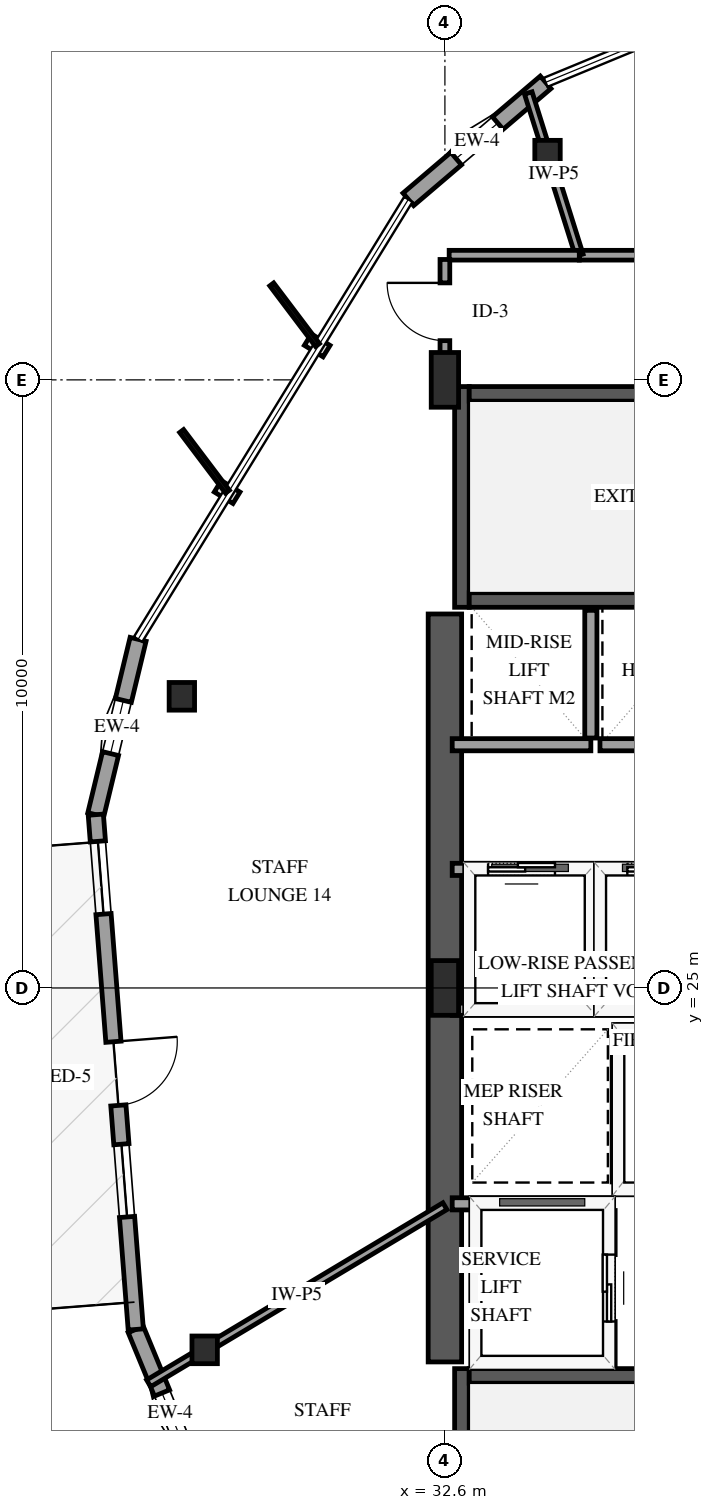
"""IFC4 building model, lengths in metres.
Left out: names, types, materials, properties, quantities, classifications, styles, units other than length and angle.
Written with IfcOpenShell. Run it as: python <this file> out.ifc"""

import sys

from ifc_helpers import new_model, si_unit, direction, frame, frame_2d, origin, origin_2d, place, context, subcontext, project, spatial, rectangle, i_section, extrude, element, fill, save


model = new_model("IFC4")
c1 = context("Model", 3, precision=1e-05, world=origin(), true_north=direction((0.0, 1.0)))
c2 = subcontext(c1, "Body", "Model", "MODEL_VIEW")
j1 = project(units=[si_unit("LENGTHUNIT", "METRE"), si_unit("PLANEANGLEUNIT", "RADIAN")], contexts=[c1])
p1 = place(None, origin())
s1 = spatial("IfcSite", under=j1, at=p1, CompositionType="ELEMENT")
p2 = place(p1, origin())
s2 = spatial("IfcBuilding", under=s1, at=p2, CompositionType="ELEMENT")
p3 = place(p2, frame((0.0, 0.0, 114.7)))
s3 = spatial("IfcBuildingStorey", under=s2, at=p3, CompositionType="ELEMENT", Elevation=114.7)
p4 = place(p3, frame((32.88, 15.11, 0.0), z_axis=(0.0, 0.0, 1.0), x_axis=(0.0, 1.0, 0.0)))
e1 = element("IfcWall", 1, at=p4, inside=s3, PredefinedType="SHEAR", context=c2, shape_type="SweptSolid", body=[
    extrude(rectangle(XDim=3.63, YDim=0.24, at=frame_2d((1.815, 0.0))), origin(), (0.0, 0.0, 1.0), 3.9),
])
p5 = place(p3, frame((33.0, 18.62, 0.0), z_axis=(0.0, 0.0, 1.0), x_axis=(1.0, 0.0, 0.0)))
e2 = element("IfcWall", 2, at=p5, inside=s3, PredefinedType="SHEAR", context=c2, shape_type="SweptSolid", body=[
    extrude(rectangle(XDim=8.0, YDim=0.24, at=frame_2d((4.0, 0.0))), origin(), (0.0, 0.0, 1.0), 3.9),
])
p6 = place(p3, frame((32.88, 31.26, 0.0), z_axis=(0.0, 0.0, 1.0), x_axis=(0.0, 1.0, 0.0)))
e3 = element("IfcWall", 3, at=p6, inside=s3, PredefinedType="SHEAR", context=c2, shape_type="SweptSolid", body=[
    extrude(rectangle(XDim=3.63, YDim=0.24, at=frame_2d((1.815, 0.0))), origin(), (0.0, 0.0, 1.0), 3.9),
])
for number, where, z_axis, x_axis in (
    (4, (33.0, 31.38, 0.0), (0.0, 0.0, 1.0), (1.0, 0.0, 0.0)),
    (5, (33.0, 34.77, 0.0), (0.0, 0.0, 1.0), (1.0, 0.0, 0.0)),
):
    element("IfcWall", number, at=place(p3, frame(where, z_axis=z_axis, x_axis=x_axis)), inside=s3, PredefinedType="SHEAR", context=c2, shape_type="SweptSolid", body=[
        extrude(rectangle(XDim=8.0, YDim=0.24, at=frame_2d((4.0, 0.0))), origin(), (0.0, 0.0, 1.0), 3.9),
    ])
p7 = place(p3, frame((32.6, 18.85, 0.0), z_axis=(0.0, 0.0, 1.0), x_axis=(0.0, 1.0, 0.0)))
e6 = element("IfcWall", 6, at=p7, inside=s3, PredefinedType="SHEAR", context=c2, shape_type="SweptSolid", body=[
    extrude(rectangle(XDim=12.3, YDim=0.55, at=frame_2d((6.15, 0.0))), origin(), (0.0, 0.0, 1.0), 3.9),
])
for number, where, z_axis, x_axis in (
    (7, (32.6, 25.0, 0.0), (0.0, 0.0, 1.0), (1.0, 0.0, 0.0)),
    (8, (32.6, 35.0, 0.0), (0.0, 0.0, 1.0), (1.0, 0.0, 0.0)),
):
    element("IfcColumn", number, at=place(p3, frame(where, z_axis=z_axis, x_axis=x_axis)), inside=s3, PredefinedType="PILASTER", context=c2, shape_type="SweptSolid", body=[
        extrude(rectangle(XDim=0.45, YDim=0.9, at=origin_2d()), origin(), (0.0, 0.0, 1.0), 3.9),
    ])
for number, where, z_axis, x_axis in (
    (9, (34.288, 38.711, 0.0), (0.0, 0.0, 1.0), (1.0, 0.0, 0.0)),
    (10, (28.274, 29.796, 0.0), (0.0, 0.0, 1.0), (1.0, 0.0, 0.0)),
    (11, (28.649, 19.049, 0.0), (0.0, 0.0, 1.0), (1.0, 0.0, 0.0)),
):
    element("IfcColumn", number, at=place(p3, frame(where, z_axis=z_axis, x_axis=x_axis)), inside=s3, PredefinedType="COLUMN", context=c2, shape_type="SweptSolid", body=[
        extrude(i_section(OverallWidth=0.418, OverallDepth=0.455, WebThickness=0.042, FlangeThickness=0.068, FilletRadius=0.038, at=origin_2d()), origin(), (0.0, 0.0, 1.0), 3.9),
    ])
p8 = place(p3, frame((34.256, 39.893, 0.0), z_axis=(0.0, 0.0, 1.0), x_axis=(-0.761118325799, -0.648613054241, 0.0)))
e12 = element("IfcWall", 12, at=p8, inside=s3, PredefinedType="SOLIDWALL", context=c2, shape_type="SweptSolid", body=[
    extrude(rectangle(XDim=2.967, YDim=0.27, at=frame_2d((1.483, 0.0))), origin(), (0.0, 0.0, 1.0), 2.979),
])
p9 = place(p8, frame((1.033, 0.0, 0.75)))
e13 = element("IfcOpeningElement", 13, at=p9, cuts=e12, PredefinedType="OPENING", context=c2, shape_type="SweptSolid", body=[
    extrude(rectangle(XDim=0.9, YDim=1.5, at=frame_2d((0.45, 0.75))), frame((0.0, 0.145, 0.0), z_axis=(0.0, -1.0, 0.0), x_axis=(1.0, 0.0, 0.0)), (0.0, 0.0, 1.0), 0.29),
])
p10 = place(p3, frame((27.554, 30.733, 0.0), z_axis=(0.0, 0.0, 1.0), x_axis=(-0.234471584184, -0.97212297381, 0.0)))
e14 = element("IfcWall", 14, at=p10, inside=s3, PredefinedType="SOLIDWALL", context=c2, shape_type="SweptSolid", body=[
    extrude(rectangle(XDim=2.967, YDim=0.27, at=frame_2d((1.483, 0.0))), origin(), (0.0, 0.0, 1.0), 2.979),
])
p11 = place(p10, frame((1.033, 0.0, 0.75)))
e15 = element("IfcOpeningElement", 15, at=p11, cuts=e14, PredefinedType="OPENING", context=c2, shape_type="SweptSolid", body=[
    extrude(rectangle(XDim=0.9, YDim=1.5, at=frame_2d((0.45, 0.75))), frame((0.0, 0.145, 0.0), z_axis=(0.0, -1.0, 0.0), x_axis=(1.0, 0.0, 0.0)), (0.0, 0.0, 1.0), 0.29),
])
p12 = place(p3, frame((27.516, 19.384, 0.0), z_axis=(0.0, 0.0, 1.0), x_axis=(0.381767795874, -0.9242582702, 0.0)))
e16 = element("IfcWall", 16, at=p12, inside=s3, PredefinedType="SOLIDWALL", context=c2, shape_type="SweptSolid", body=[
    extrude(rectangle(XDim=2.967, YDim=0.27, at=frame_2d((1.483, 0.0))), origin(), (0.0, 0.0, 1.0), 2.979),
])
p13 = place(p12, frame((1.131, 0.0, 0.75)))
e17 = element("IfcOpeningElement", 17, at=p13, cuts=e16, PredefinedType="OPENING", context=c2, shape_type="SweptSolid", body=[
    extrude(rectangle(XDim=0.9, YDim=1.5, at=frame_2d((0.45, 0.75))), frame((0.0, 0.145, 0.0), z_axis=(0.0, -1.0, 0.0), x_axis=(1.0, 0.0, 0.0)), (0.0, 0.0, 1.0), 0.29),
])
p14 = place(p3, frame((26.859, 27.85, 0.0), z_axis=(0.0, 0.0, 1.0), x_axis=(0.077404492849, -0.996999771558, 0.0)))
e18 = element("IfcWall", 18, at=p14, inside=s3, PredefinedType="SOLIDWALL", context=c2, shape_type="SweptSolid", body=[
    extrude(rectangle(XDim=8.491, YDim=0.25, at=frame_2d((4.245, 0.0))), origin(), (0.0, 0.0, 1.0), 2.979),
])
p15 = place(p14, frame((3.745, 0.0, 0.0)))
e19 = element("IfcOpeningElement", 19, at=p15, cuts=e18, PredefinedType="OPENING", context=c2, shape_type="SweptSolid", body=[
    extrude(rectangle(XDim=1.05, YDim=2.15, at=frame_2d((0.525, 1.075))), frame((0.0, 0.135, 0.0), z_axis=(0.0, -1.0, 0.0), x_axis=(1.0, 0.0, 0.0)), (0.0, 0.0, 1.0), 0.27),
])
p16 = place(p14, frame((0.44, 0.0, 0.72)))
e20 = element("IfcOpeningElement", 20, at=p16, cuts=e18, PredefinedType="OPENING", context=c2, shape_type="SweptSolid", body=[
    extrude(rectangle(XDim=1.2, YDim=1.6, at=frame_2d((0.6, 0.8))), frame((0.0, 0.135, 0.0), z_axis=(0.0, -1.0, 0.0), x_axis=(1.0, 0.0, 0.0)), (0.0, 0.0, 1.0), 0.27),
])
p17 = place(p14, frame((5.435, 0.0, 0.72)))
e21 = element("IfcOpeningElement", 21, at=p17, cuts=e18, PredefinedType="OPENING", context=c2, shape_type="SweptSolid", body=[
    extrude(rectangle(XDim=1.2, YDim=1.6, at=frame_2d((0.6, 0.8))), frame((0.0, 0.135, 0.0), z_axis=(0.0, -1.0, 0.0), x_axis=(1.0, 0.0, 0.0)), (0.0, 0.0, 1.0), 0.27),
])
p18 = place(p3, frame((35.45, 21.7, 0.0), z_axis=(0.0, 0.0, 1.0), x_axis=(1.0, 0.0, 0.0)))
e22 = element("IfcWall", 22, at=p18, inside=s3, PredefinedType="SOLIDWALL", context=c2, shape_type="SweptSolid", body=[
    extrude(rectangle(XDim=2.0, YDim=0.2, at=frame_2d((1.0, 0.0))), origin(), (0.0, 0.0, 1.0), 3.6),
])
p19 = place(p18, frame((0.45, 0.0, 0.0)))
e23 = element("IfcOpeningElement", 23, at=p19, cuts=e22, PredefinedType="OPENING", context=c2, shape_type="SweptSolid", body=[
    extrude(rectangle(XDim=1.1, YDim=2.15, at=frame_2d((0.55, 1.075))), frame((0.0, 0.11, 0.0), z_axis=(0.0, -1.0, 0.0), x_axis=(1.0, 0.0, 0.0)), (0.0, 0.0, 1.0), 0.22),
])
p20 = place(p3, frame((35.45, 24.3, 0.0), z_axis=(0.0, 0.0, 1.0), x_axis=(1.0, 0.0, 0.0)))
e24 = element("IfcWall", 24, at=p20, inside=s3, PredefinedType="SOLIDWALL", context=c2, shape_type="SweptSolid", body=[
    extrude(rectangle(XDim=2.0, YDim=0.2, at=frame_2d((1.0, 0.0))), origin(), (0.0, 0.0, 1.0), 3.6),
])
p21 = place(p3, frame((35.45, 21.81, 0.0), z_axis=(0.0, 0.0, 1.0), x_axis=(0.0, 1.0, 0.0)))
e25 = element("IfcWall", 25, at=p21, inside=s3, PredefinedType="SOLIDWALL", context=c2, shape_type="SweptSolid", body=[
    extrude(rectangle(XDim=2.38, YDim=0.2, at=frame_2d((1.19, 0.0))), origin(), (0.0, 0.0, 1.0), 3.6),
])
p22 = place(p3, frame((32.72, 21.45, 0.0), z_axis=(0.0, 0.0, 1.0), x_axis=(1.0, 0.0, 0.0)))
e26 = element("IfcWall", 26, at=p22, inside=s3, PredefinedType="SOLIDWALL", context=c2, shape_type="SweptSolid", body=[
    extrude(rectangle(XDim=2.58, YDim=0.2, at=frame_2d((1.29, 0.0))), origin(), (0.0, 0.0, 1.0), 3.6),
])
p23 = place(p3, frame((35.3, 18.79, 0.0), z_axis=(0.0, 0.0, 1.0), x_axis=(0.0, 1.0, 0.0)))
e27 = element("IfcWall", 27, at=p23, inside=s3, PredefinedType="SOLIDWALL", context=c2, shape_type="SweptSolid", body=[
    extrude(rectangle(XDim=2.55, YDim=0.2, at=frame_2d((1.275, 0.0))), origin(), (0.0, 0.0, 1.0), 3.6),
])
p24 = place(p23, frame((0.725, 0.0, 0.0)))
e28 = element("IfcOpeningElement", 28, at=p24, cuts=e27, PredefinedType="OPENING", context=c2, shape_type="SweptSolid", body=[
    extrude(rectangle(XDim=1.1, YDim=2.15, at=frame_2d((0.55, 1.075))), frame((0.0, 0.11, 0.0), z_axis=(0.0, -1.0, 0.0), x_axis=(1.0, 0.0, 0.0)), (0.0, 0.0, 1.0), 0.22),
])
p25 = place(p3, frame((32.72, 24.65, 0.0), z_axis=(0.0, 0.0, 1.0), x_axis=(1.0, 0.0, 0.0)))
e29 = element("IfcWall", 29, at=p25, inside=s3, PredefinedType="SOLIDWALL", context=c2, shape_type="SweptSolid", body=[
    extrude(rectangle(XDim=2.28, YDim=0.2, at=frame_2d((1.14, 0.0))), origin(), (0.0, 0.0, 1.0), 3.6),
])
p26 = place(p3, frame((32.72, 26.95, 0.0), z_axis=(0.0, 0.0, 1.0), x_axis=(1.0, 0.0, 0.0)))
e30 = element("IfcWall", 30, at=p26, inside=s3, PredefinedType="SOLIDWALL", context=c2, shape_type="SweptSolid", body=[
    extrude(rectangle(XDim=2.28, YDim=0.2, at=frame_2d((1.14, 0.0))), origin(), (0.0, 0.0, 1.0), 3.6),
])
p27 = place(p26, frame((0.59, 0.0, 0.0)))
e31 = element("IfcOpeningElement", 31, at=p27, cuts=e30, PredefinedType="OPENING", context=c2, shape_type="SweptSolid", body=[
    extrude(rectangle(XDim=1.1, YDim=2.15, at=frame_2d((0.55, 1.075))), frame((0.0, 0.11, 0.0), z_axis=(0.0, -1.0, 0.0), x_axis=(1.0, 0.0, 0.0)), (0.0, 0.0, 1.0), 0.22),
])
p28 = place(p3, frame((35.0, 24.76, 0.0), z_axis=(0.0, 0.0, 1.0), x_axis=(0.0, 1.0, 0.0)))
e32 = element("IfcWall", 32, at=p28, inside=s3, PredefinedType="SOLIDWALL", context=c2, shape_type="SweptSolid", body=[
    extrude(rectangle(XDim=2.08, YDim=0.2, at=frame_2d((1.04, 0.0))), origin(), (0.0, 0.0, 1.0), 3.6),
])
p29 = place(p3, frame((35.15, 24.65, 0.0), z_axis=(0.0, 0.0, 1.0), x_axis=(1.0, 0.0, 0.0)))
e33 = element("IfcWall", 33, at=p29, inside=s3, PredefinedType="SOLIDWALL", context=c2, shape_type="SweptSolid", body=[
    extrude(rectangle(XDim=2.0, YDim=0.2, at=frame_2d((1.0, 0.0))), origin(), (0.0, 0.0, 1.0), 3.6),
])
p30 = place(p3, frame((35.15, 26.95, 0.0), z_axis=(0.0, 0.0, 1.0), x_axis=(1.0, 0.0, 0.0)))
e34 = element("IfcWall", 34, at=p30, inside=s3, PredefinedType="SOLIDWALL", context=c2, shape_type="SweptSolid", body=[
    extrude(rectangle(XDim=2.0, YDim=0.2, at=frame_2d((1.0, 0.0))), origin(), (0.0, 0.0, 1.0), 3.6),
])
p31 = place(p30, frame((0.45, 0.0, 0.0)))
e35 = element("IfcOpeningElement", 35, at=p31, cuts=e34, PredefinedType="OPENING", context=c2, shape_type="SweptSolid", body=[
    extrude(rectangle(XDim=1.1, YDim=2.15, at=frame_2d((0.55, 1.075))), frame((0.0, 0.11, 0.0), z_axis=(0.0, -1.0, 0.0), x_axis=(1.0, 0.0, 0.0)), (0.0, 0.0, 1.0), 0.22),
])
p32 = place(p3, frame((32.72, 29.0, 0.0), z_axis=(0.0, 0.0, 1.0), x_axis=(1.0, 0.0, 0.0)))
e36 = element("IfcWall", 36, at=p32, inside=s3, PredefinedType="SOLIDWALL", context=c2, shape_type="SweptSolid", body=[
    extrude(rectangle(XDim=2.28, YDim=0.2, at=frame_2d((1.14, 0.0))), origin(), (0.0, 0.0, 1.0), 3.6),
])
p33 = place(p3, frame((35.0, 29.11, 0.0), z_axis=(0.0, 0.0, 1.0), x_axis=(0.0, 1.0, 0.0)))
e37 = element("IfcWall", 37, at=p33, inside=s3, PredefinedType="SOLIDWALL", context=c2, shape_type="SweptSolid", body=[
    extrude(rectangle(XDim=2.1, YDim=0.2, at=frame_2d((1.05, 0.0))), origin(), (0.0, 0.0, 1.0), 3.6),
])
p34 = place(p3, frame((35.15, 29.0, 0.0), z_axis=(0.0, 0.0, 1.0), x_axis=(1.0, 0.0, 0.0)))
e38 = element("IfcWall", 38, at=p34, inside=s3, PredefinedType="SOLIDWALL", context=c2, shape_type="SweptSolid", body=[
    extrude(rectangle(XDim=2.0, YDim=0.2, at=frame_2d((1.0, 0.0))), origin(), (0.0, 0.0, 1.0), 3.6),
])
p35 = place(p3, frame((32.6, 21.411, 0.0), z_axis=(0.0, 0.0, 1.0), x_axis=(-0.858300195468, -0.513147907002, 0.0)))
e39 = element("IfcWall", 39, at=p35, inside=s3, PredefinedType="PARTITIONING", context=c2, shape_type="SweptSolid", body=[
    extrude(rectangle(XDim=5.677, YDim=0.13, at=frame_2d((2.838, 0.0))), origin(), (0.0, 0.0, 1.0), 2.978),
])
p36 = place(p3, frame((34.81, 37.05, 0.0), z_axis=(0.0, 0.0, 1.0), x_axis=(1.0, 0.0, 0.0)))
e40 = element("IfcWall", 40, at=p36, inside=s3, PredefinedType="PARTITIONING", context=c2, shape_type="SweptSolid", body=[
    extrude(rectangle(XDim=3.514, YDim=0.16, at=frame_2d((1.757, 0.0))), origin(), (0.0, 0.0, 1.0), 3.6),
])
p37 = place(p36, frame((1.282, 0.0, 0.0)))
e41 = element("IfcOpeningElement", 41, at=p37, cuts=e40, PredefinedType="OPENING", context=c2, shape_type="SweptSolid", body=[
    extrude(rectangle(XDim=0.95, YDim=2.15, at=frame_2d((0.475, 1.075))), frame((0.0, 0.09, 0.0), z_axis=(0.0, -1.0, 0.0), x_axis=(1.0, 0.0, 0.0)), (0.0, 0.0, 1.0), 0.18),
])
p38 = place(p3, frame((34.81, 37.05, 0.0), z_axis=(0.0, 0.0, 1.0), x_axis=(-0.300024068353, 0.953931631936, 0.0)))
e42 = element("IfcWall", 42, at=p38, inside=s3, PredefinedType="PARTITIONING", context=c2, shape_type="SweptSolid", body=[
    extrude(rectangle(XDim=2.797, YDim=0.13, at=frame_2d((1.398, 0.0))), origin(), (0.0, 0.0, 1.0), 2.895),
])
p39 = place(p3, frame((32.67, 37.05, 0.0), z_axis=(0.0, 0.0, 1.0), x_axis=(1.0, 0.0, 0.0)))
e43 = element("IfcWall", 43, at=p39, inside=s3, PredefinedType="PARTITIONING", context=c2, shape_type="SweptSolid", body=[
    extrude(rectangle(XDim=2.14, YDim=0.16, at=frame_2d((1.07, 0.0))), origin(), (0.0, 0.0, 1.0), 3.6),
])
p40 = place(p3, frame((32.6, 35.07, 0.0), z_axis=(0.0, 0.0, 1.0), x_axis=(0.0, 1.0, 0.0)))
e44 = element("IfcWall", 44, at=p40, inside=s3, PredefinedType="PARTITIONING", context=c2, shape_type="SweptSolid", body=[
    extrude(rectangle(XDim=1.91, YDim=0.16, at=frame_2d((0.955, 0.0))), origin(), (0.0, 0.0, 1.0), 3.6),
])
p41 = place(p40, frame((0.575, 0.0, 0.0)))
e45 = element("IfcOpeningElement", 45, at=p41, cuts=e44, PredefinedType="OPENING", context=c2, shape_type="SweptSolid", body=[
    extrude(rectangle(XDim=0.95, YDim=2.15, at=frame_2d((0.475, 1.075))), frame((0.0, 0.09, 0.0), z_axis=(0.0, -1.0, 0.0), x_axis=(1.0, 0.0, 0.0)), (0.0, 0.0, 1.0), 0.18),
])
p42 = place(p9, origin())
e46 = element("IfcWindow", 46, at=p42, inside=s3, PartitioningType="SINGLE_PANEL", PredefinedType="WINDOW", context=c2, shape_type="SweptSolid", body=[
    extrude(rectangle(XDim=0.9, YDim=1.5, at=frame_2d((0.45, 0.75))), frame((0.0, 0.03, 0.0), z_axis=(0.0, -1.0, 0.0), x_axis=(1.0, 0.0, 0.0)), (0.0, 0.0, 1.0), 0.06),
])
fill(e13, e46)
p43 = place(p11, origin())
e47 = element("IfcWindow", 47, at=p43, inside=s3, PartitioningType="SINGLE_PANEL", PredefinedType="WINDOW", context=c2, shape_type="SweptSolid", body=[
    extrude(rectangle(XDim=0.9, YDim=1.5, at=frame_2d((0.45, 0.75))), frame((0.0, 0.03, 0.0), z_axis=(0.0, -1.0, 0.0), x_axis=(1.0, 0.0, 0.0)), (0.0, 0.0, 1.0), 0.06),
])
fill(e15, e47)
p44 = place(p13, origin())
e48 = element("IfcWindow", 48, at=p44, inside=s3, PartitioningType="SINGLE_PANEL", PredefinedType="WINDOW", context=c2, shape_type="SweptSolid", body=[
    extrude(rectangle(XDim=0.9, YDim=1.5, at=frame_2d((0.45, 0.75))), frame((0.0, 0.03, 0.0), z_axis=(0.0, -1.0, 0.0), x_axis=(1.0, 0.0, 0.0)), (0.0, 0.0, 1.0), 0.06),
])
fill(e17, e48)
p45 = place(p15, origin())
e49 = element("IfcDoor", 49, at=p45, inside=s3, OperationType="SINGLE_SWING_LEFT", PredefinedType="DOOR", context=c2, shape_type="SweptSolid", body=[
    extrude(rectangle(XDim=1.05, YDim=2.15, at=frame_2d((0.525, 1.075))), frame((0.0, 0.025, 0.0), z_axis=(0.0, -1.0, 0.0), x_axis=(1.0, 0.0, 0.0)), (0.0, 0.0, 1.0), 0.05),
])
fill(e19, e49)
p46 = place(p16, origin())
e50 = element("IfcWindow", 50, at=p46, inside=s3, PartitioningType="SINGLE_PANEL", PredefinedType="WINDOW", context=c2, shape_type="SweptSolid", body=[
    extrude(rectangle(XDim=1.2, YDim=1.6, at=frame_2d((0.6, 0.8))), frame((0.0, 0.03, 0.0), z_axis=(0.0, -1.0, 0.0), x_axis=(1.0, 0.0, 0.0)), (0.0, 0.0, 1.0), 0.06),
])
fill(e20, e50)
p47 = place(p17, origin())
e51 = element("IfcWindow", 51, at=p47, inside=s3, PartitioningType="SINGLE_PANEL", PredefinedType="WINDOW", context=c2, shape_type="SweptSolid", body=[
    extrude(rectangle(XDim=1.2, YDim=1.6, at=frame_2d((0.6, 0.8))), frame((0.0, 0.03, 0.0), z_axis=(0.0, -1.0, 0.0), x_axis=(1.0, 0.0, 0.0)), (0.0, 0.0, 1.0), 0.06),
])
fill(e21, e51)
p48 = place(p24, origin())
e52 = element("IfcDoor", 52, at=p48, inside=s3, OperationType="SLIDING_TO_LEFT", PredefinedType="DOOR", context=c2, shape_type="SweptSolid", body=[
    extrude(rectangle(XDim=1.1, YDim=2.15, at=frame_2d((0.55, 1.075))), frame((0.0, 0.025, 0.0), z_axis=(0.0, -1.0, 0.0), x_axis=(1.0, 0.0, 0.0)), (0.0, 0.0, 1.0), 0.05),
])
fill(e28, e52)
p49 = place(p27, origin())
e53 = element("IfcDoor", 53, at=p49, inside=s3, OperationType="SLIDING_TO_LEFT", PredefinedType="DOOR", context=c2, shape_type="SweptSolid", body=[
    extrude(rectangle(XDim=1.1, YDim=2.15, at=frame_2d((0.55, 1.075))), frame((0.0, 0.025, 0.0), z_axis=(0.0, -1.0, 0.0), x_axis=(1.0, 0.0, 0.0)), (0.0, 0.0, 1.0), 0.05),
])
fill(e31, e53)
p50 = place(p31, origin())
e54 = element("IfcDoor", 54, at=p50, inside=s3, OperationType="SLIDING_TO_LEFT", PredefinedType="DOOR", context=c2, shape_type="SweptSolid", body=[
    extrude(rectangle(XDim=1.1, YDim=2.15, at=frame_2d((0.55, 1.075))), frame((0.0, 0.025, 0.0), z_axis=(0.0, -1.0, 0.0), x_axis=(1.0, 0.0, 0.0)), (0.0, 0.0, 1.0), 0.05),
])
fill(e35, e54)
p51 = place(p41, origin())
e55 = element("IfcDoor", 55, at=p51, inside=s3, OperationType="SINGLE_SWING_RIGHT", PredefinedType="DOOR", context=c2, shape_type="SweptSolid", body=[
    extrude(rectangle(XDim=0.95, YDim=2.15, at=frame_2d((0.475, 1.075))), frame((0.0, 0.025, 0.0), z_axis=(0.0, -1.0, 0.0), x_axis=(1.0, 0.0, 0.0)), (0.0, 0.0, 1.0), 0.05),
])
fill(e45, e55)
save(model, sys.argv[1])
